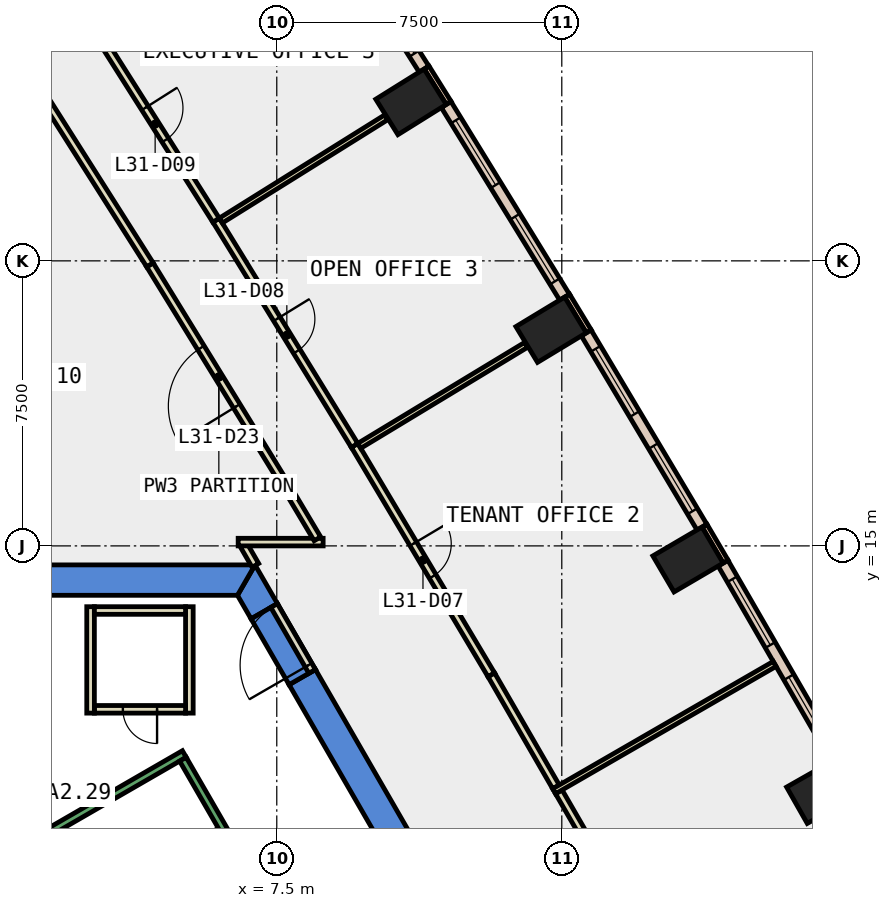
"""IFC4 building model, lengths in metres.
Left out: names, types, materials, properties, quantities, classifications, styles, units other than length and angle.
Written with IfcOpenShell. Run it as: python <this file> out.ifc"""

import sys

from ifc_helpers import new_model, si_unit, direction, frame, frame_2d, origin, origin_2d, place, context, subcontext, project, spatial, polyline, rectangle, outline, extrude, element, fill, save


model = new_model("IFC4")
c1 = context("Model", 3, precision=1e-05, world=origin(), true_north=direction((0.0, 1.0)))
c2 = subcontext(c1, "Body", "Model", "MODEL_VIEW")
j1 = project(units=[si_unit("LENGTHUNIT", "METRE"), si_unit("PLANEANGLEUNIT", "RADIAN")], contexts=[c1])
p1 = place(None, origin())
s1 = spatial("IfcSite", under=j1, at=p1, CompositionType="ELEMENT")
p2 = place(p1, origin())
s2 = spatial("IfcBuilding", under=s1, at=p2, CompositionType="ELEMENT")
p3 = place(p2, frame((0.0, 0.0, 142.4)))
s3 = spatial("IfcBuildingStorey", under=s2, at=p3, CompositionType="ELEMENT", Elevation=142.4)
for number, where, z_axis, x_axis in (
    (1, (21.84, 8.546, -0.4), (0.0, 0.0, 1.0), (-0.494, 0.869, 0.0)),
    (2, (18.322, 14.642, -0.4), (0.0, 0.0, 1.0), (-0.506, 0.863, 0.0)),
    (3, (14.719, 20.688, -0.4), (0.0, 0.0, 1.0), (-0.518, 0.855, 0.0)),
    (4, (11.033, 26.684, -0.4), (0.0, 0.0, 1.0), (-0.53, 0.848, 0.0)),
):
    element("IfcColumn", number, at=place(p3, frame(where, z_axis=z_axis, x_axis=x_axis)), inside=s3, PredefinedType="COLUMN", context=c2, shape_type="SweptSolid", body=[
        extrude(rectangle(XDim=1.1, YDim=1.5, at=origin_2d()), origin(), (0.0, 0.0, 1.0), 4.2),
    ])
p4 = place(p3, frame((0.0, 0.0, -0.4)))
e5 = element("IfcWall", 5, at=p4, inside=s3, PredefinedType="SHEAR", context=c2, shape_type="SweptSolid", body=[
    extrude(outline(polyline([(8.517, 11.748), (7.824, 11.348), (12.933, 2.5), (13.856, 2.5), (8.517, 11.748)])), origin(), (0.0, 0.0, 1.0), 4.2),
])
p5 = place(p3, frame((0.0, 0.0, -0.4)))
e6 = element("IfcWall", 6, at=p5, inside=s3, PredefinedType="SHEAR", context=c2, shape_type="SweptSolid", body=[
    extrude(outline(polyline([(6.824, 13.08), (7.517, 13.48), (6.928, 14.5), (6.466, 13.7), (6.824, 13.08)])), origin(), (0.0, 0.0, 1.0), 4.2),
])
p6 = place(p3, frame((0.0, 0.0, 3.6)))
e7 = element("IfcWall", 7, at=p6, inside=s3, PredefinedType="SHEAR", context=c2, shape_type="SweptSolid", body=[
    extrude(outline(polyline([(7.517, 13.48), (6.824, 13.08), (7.824, 11.348), (8.517, 11.748), (7.517, 13.48)])), origin(), (0.0, 0.0, 1.0), 0.2),
])
p7 = place(p3, frame((0.0, 0.0, -0.4)))
e8 = element("IfcWall", 8, at=p7, inside=s3, PredefinedType="SHEAR", context=c2, shape_type="SweptSolid", body=[
    extrude(outline(polyline([(6.928, 14.5), (-6.928, 14.5), (-6.466, 13.7), (6.466, 13.7), (6.928, 14.5)])), origin(), (0.0, 0.0, 1.0), 4.2),
])
p8 = place(p3, frame((19.312, 14.585, 0.0), z_axis=(0.0, 0.0, 1.0), x_axis=(-0.50667077411, 0.862139621327, 0.0)))
e9 = element("IfcWall", 9, at=p8, inside=s3, PredefinedType="STANDARD", context=c2, shape_type="SweptSolid", body=[
    extrude(rectangle(XDim=1.1, YDim=0.15, at=frame_2d((0.55, 0.0))), origin(), (0.0, 0.0, 1.0), 3.8),
])
for number, where, z_axis, x_axis in (
    (10, (15.71, 20.645, 0.0), (0.0, 0.0, 1.0), (-0.518, 0.855, 0.0)),
    (11, (12.024, 26.655, 0.0), (0.0, 0.0, 1.0), (-0.53, 0.848, 0.0)),
):
    element("IfcWall", number, at=place(p3, frame(where, z_axis=z_axis, x_axis=x_axis)), inside=s3, PredefinedType="STANDARD", context=c2, shape_type="SweptSolid", body=[
        extrude(rectangle(XDim=1.1, YDim=0.15, at=frame_2d((0.55, 0.0))), origin(), (0.0, 0.0, 1.0), 3.8),
    ])
p9 = place(p3, frame((22.218, 9.392, 0.0), z_axis=(0.0, 0.0, 1.0), x_axis=(-0.49994263896, 0.866058518664, 0.0)))
e12 = element("IfcWall", 12, at=p9, inside=s3, PredefinedType="STANDARD", context=c2, shape_type="SweptSolid", body=[
    extrude(rectangle(XDim=5.951, YDim=0.3, at=frame_2d((2.976, 0.0))), origin(), (0.0, 0.0, 1.0), 3.8),
])
p10 = place(p9, frame((0.488, 0.0, 0.9)))
e13 = element("IfcOpeningElement", 13, at=p10, cuts=e12, PredefinedType="OPENING", context=c2, shape_type="SweptSolid", body=[
    extrude(rectangle(XDim=2.0, YDim=2.6, at=frame_2d((1.0, 1.3))), frame((0.0, 0.16, 0.0), z_axis=(0.0, -1.0, 0.0), x_axis=(1.0, 0.0, 0.0)), (0.0, 0.0, 1.0), 0.32),
])
p11 = place(p9, frame((3.463, 0.0, 0.9)))
e14 = element("IfcOpeningElement", 14, at=p11, cuts=e12, PredefinedType="OPENING", context=c2, shape_type="SweptSolid", body=[
    extrude(rectangle(XDim=2.0, YDim=2.6, at=frame_2d((1.0, 1.3))), frame((0.0, 0.16, 0.0), z_axis=(0.0, -1.0, 0.0), x_axis=(1.0, 0.0, 0.0)), (0.0, 0.0, 1.0), 0.32),
])
p12 = place(p3, frame((18.688, 15.493, 0.0), z_axis=(0.0, 0.0, 1.0), x_axis=(-0.511856715331, 0.859070836992, 0.0)))
e15 = element("IfcWall", 15, at=p12, inside=s3, PredefinedType="STANDARD", context=c2, shape_type="SweptSolid", body=[
    extrude(rectangle(XDim=5.951, YDim=0.3, at=frame_2d((2.975, 0.0))), origin(), (0.0, 0.0, 1.0), 3.8),
])
p13 = place(p12, frame((0.488, 0.0, 0.9)))
e16 = element("IfcOpeningElement", 16, at=p13, cuts=e15, PredefinedType="OPENING", context=c2, shape_type="SweptSolid", body=[
    extrude(rectangle(XDim=2.0, YDim=2.6, at=frame_2d((1.0, 1.3))), frame((0.0, 0.16, 0.0), z_axis=(0.0, -1.0, 0.0), x_axis=(1.0, 0.0, 0.0)), (0.0, 0.0, 1.0), 0.32),
])
p14 = place(p12, frame((3.463, 0.0, 0.9)))
e17 = element("IfcOpeningElement", 17, at=p14, cuts=e15, PredefinedType="OPENING", context=c2, shape_type="SweptSolid", body=[
    extrude(rectangle(XDim=2.0, YDim=2.6, at=frame_2d((1.0, 1.3))), frame((0.0, 0.16, 0.0), z_axis=(0.0, -1.0, 0.0), x_axis=(1.0, 0.0, 0.0)), (0.0, 0.0, 1.0), 0.32),
])
p15 = place(p3, frame((15.073, 21.544, 0.0), z_axis=(0.0, 0.0, 1.0), x_axis=(-0.523719731127, 0.851890628677, 0.0)))
e18 = element("IfcWall", 18, at=p15, inside=s3, PredefinedType="STANDARD", context=c2, shape_type="SweptSolid", body=[
    extrude(rectangle(XDim=5.952, YDim=0.3, at=frame_2d((2.976, 0.0))), origin(), (0.0, 0.0, 1.0), 3.8),
])
p16 = place(p15, frame((0.488, 0.0, 0.9)))
e19 = element("IfcOpeningElement", 19, at=p16, cuts=e18, PredefinedType="OPENING", context=c2, shape_type="SweptSolid", body=[
    extrude(rectangle(XDim=2.0, YDim=2.6, at=frame_2d((1.0, 1.3))), frame((0.0, 0.16, 0.0), z_axis=(0.0, -1.0, 0.0), x_axis=(1.0, 0.0, 0.0)), (0.0, 0.0, 1.0), 0.32),
])
p17 = place(p15, frame((3.464, 0.0, 0.9)))
e20 = element("IfcOpeningElement", 20, at=p17, cuts=e18, PredefinedType="OPENING", context=c2, shape_type="SweptSolid", body=[
    extrude(rectangle(XDim=2.0, YDim=2.6, at=frame_2d((1.0, 1.3))), frame((0.0, 0.16, 0.0), z_axis=(0.0, -1.0, 0.0), x_axis=(1.0, 0.0, 0.0)), (0.0, 0.0, 1.0), 0.32),
])
p18 = place(p3, frame((11.375, 27.545, 0.0), z_axis=(0.0, 0.0, 1.0), x_axis=(-0.535403761464, 0.844596242124, 0.0)))
e21 = element("IfcWall", 21, at=p18, inside=s3, PredefinedType="STANDARD", context=c2, shape_type="SweptSolid", body=[
    extrude(rectangle(XDim=5.928, YDim=0.3, at=frame_2d((2.964, 0.0))), origin(), (0.0, 0.0, 1.0), 3.8),
])
p19 = place(p18, frame((0.482, 0.0, 0.9)))
e22 = element("IfcOpeningElement", 22, at=p19, cuts=e21, PredefinedType="OPENING", context=c2, shape_type="SweptSolid", body=[
    extrude(rectangle(XDim=2.0, YDim=2.6, at=frame_2d((1.0, 1.3))), frame((0.0, 0.16, 0.0), z_axis=(0.0, -1.0, 0.0), x_axis=(1.0, 0.0, 0.0)), (0.0, 0.0, 1.0), 0.32),
])
p20 = place(p18, frame((3.446, 0.0, 0.9)))
e23 = element("IfcOpeningElement", 23, at=p20, cuts=e21, PredefinedType="OPENING", context=c2, shape_type="SweptSolid", body=[
    extrude(rectangle(XDim=2.0, YDim=2.6, at=frame_2d((1.0, 1.3))), frame((0.0, 0.16, 0.0), z_axis=(0.0, -1.0, 0.0), x_axis=(1.0, 0.0, 0.0)), (0.0, 0.0, 1.0), 0.32),
])
p21 = place(p3, frame((6.937, 14.488, 0.0), z_axis=(0.0, 0.0, 1.0), x_axis=(-0.499908430952, 0.866078264744, 0.0)))
e24 = element("IfcWall", 24, at=p21, inside=s3, PredefinedType="PARTITIONING", context=c2, shape_type="SweptSolid", body=[
    extrude(rectangle(XDim=0.606, YDim=0.2, at=frame_2d((0.303, 0.0))), origin(), (0.0, 0.0, 1.0), 3.8),
])
p22 = place(p3, frame((6.484, 15.1, 0.0), z_axis=(0.0, 0.0, 1.0), x_axis=(1.0, 0.0, 0.0)))
e25 = element("IfcWall", 25, at=p22, inside=s3, PredefinedType="PARTITIONING", context=c2, shape_type="SweptSolid", body=[
    extrude(rectangle(XDim=2.236, YDim=0.2, at=frame_2d((1.118, 0.0))), origin(), (0.0, 0.0, 1.0), 3.8),
])
p23 = place(p3, frame((8.569, 15.186, 0.0), z_axis=(0.0, 0.0, 1.0), x_axis=(-0.512230585803, 0.85884796499, 0.0)))
e26 = element("IfcWall", 26, at=p23, inside=s3, PredefinedType="PARTITIONING", context=c2, shape_type="SweptSolid", body=[
    extrude(rectangle(XDim=1.523, YDim=0.2, at=frame_2d((0.761, 0.0))), origin(), (0.0, 0.0, 1.0), 3.8),
])
p24 = place(p3, frame((7.789, 16.494, 0.0), z_axis=(0.0, 0.0, 1.0), x_axis=(-0.523625371849, 0.851948631055, 0.0)))
e27 = element("IfcWall", 27, at=p24, inside=s3, PredefinedType="PARTITIONING", context=c2, shape_type="SweptSolid", body=[
    extrude(rectangle(XDim=6.927, YDim=0.2, at=frame_2d((3.463, 0.0))), origin(), (0.0, 0.0, 1.0), 3.8),
])
p25 = place(p24, frame((2.564, 0.0, 0.0)))
e28 = element("IfcOpeningElement", 28, at=p25, cuts=e27, PredefinedType="OPENING", context=c2, shape_type="SweptSolid", body=[
    extrude(rectangle(XDim=1.8, YDim=2.1, at=frame_2d((0.9, 1.05))), frame((0.0, 0.11, 0.0), z_axis=(0.0, -1.0, 0.0), x_axis=(1.0, 0.0, 0.0)), (0.0, 0.0, 1.0), 0.22),
])
p26 = place(p3, frame((4.162, 22.395, 0.0), z_axis=(0.0, 0.0, 1.0), x_axis=(-0.535496886312, 0.844537201519, 0.0)))
e29 = element("IfcWall", 29, at=p26, inside=s3, PredefinedType="PARTITIONING", context=c2, shape_type="SweptSolid", body=[
    extrude(rectangle(XDim=5.927, YDim=0.2, at=frame_2d((2.964, 0.0))), origin(), (0.0, 0.0, 1.0), 3.8),
])
p27 = place(p3, frame((14.922, 8.529, 0.0), z_axis=(0.0, 0.0, 1.0), x_axis=(0.500097109062, -0.865969330582, 0.0)))
e30 = element("IfcWall", 30, at=p27, inside=s3, PredefinedType="PARTITIONING", context=c2, shape_type="SweptSolid", body=[
    extrude(rectangle(XDim=3.403, YDim=0.2, at=frame_2d((1.702, 0.0))), origin(), (0.0, 0.0, 1.0), 3.8),
])
p28 = place(p3, frame((9.548, 17.645, 0.0), z_axis=(0.0, 0.0, 1.0), x_axis=(0.511822081848, -0.859091471575, 0.0)))
e31 = element("IfcWall", 31, at=p28, inside=s3, PredefinedType="PARTITIONING", context=c2, shape_type="SweptSolid", body=[
    extrude(rectangle(XDim=7.03, YDim=0.2, at=frame_2d((3.515, 0.0))), origin(), (0.0, 0.0, 1.0), 3.8),
])
p29 = place(p28, frame((3.015, 0.0, 0.0)))
e32 = element("IfcOpeningElement", 32, at=p29, cuts=e31, PredefinedType="OPENING", context=c2, shape_type="SweptSolid", body=[
    extrude(rectangle(XDim=1.0, YDim=2.1, at=frame_2d((0.5, 1.05))), frame((0.0, 0.11, 0.0), z_axis=(0.0, -1.0, 0.0), x_axis=(1.0, 0.0, 0.0)), (0.0, 0.0, 1.0), 0.22),
])
p30 = place(p3, frame((13.146, 11.606, 0.0), z_axis=(0.0, 0.0, 1.0), x_axis=(0.499881871653, -0.866093594476, 0.0)))
e33 = element("IfcWall", 33, at=p30, inside=s3, PredefinedType="PARTITIONING", context=c2, shape_type="SweptSolid", body=[
    extrude(rectangle(XDim=3.403, YDim=0.2, at=frame_2d((1.701, 0.0))), origin(), (0.0, 0.0, 1.0), 3.8),
])
p31 = place(p3, frame((5.904, 23.571, 0.0), z_axis=(0.0, 0.0, 1.0), x_axis=(0.523647026552, -0.851935321244, 0.0)))
e34 = element("IfcWall", 34, at=p31, inside=s3, PredefinedType="PARTITIONING", context=c2, shape_type="SweptSolid", body=[
    extrude(rectangle(XDim=6.957, YDim=0.2, at=frame_2d((3.479, 0.0))), origin(), (0.0, 0.0, 1.0), 3.8),
])
p32 = place(p31, frame((3.053, 0.0, 0.0)))
e35 = element("IfcOpeningElement", 35, at=p32, cuts=e34, PredefinedType="OPENING", context=c2, shape_type="SweptSolid", body=[
    extrude(rectangle(XDim=1.0, YDim=2.1, at=frame_2d((0.5, 1.05))), frame((0.0, 0.11, 0.0), z_axis=(0.0, -1.0, 0.0), x_axis=(1.0, 0.0, 0.0)), (0.0, 0.0, 1.0), 0.22),
])
p33 = place(p3, frame((2.616, 28.754, 0.0), z_axis=(0.0, 0.0, 1.0), x_axis=(0.535405016332, -0.844595446641, 0.0)))
e36 = element("IfcWall", 36, at=p33, inside=s3, PredefinedType="PARTITIONING", context=c2, shape_type="SweptSolid", body=[
    extrude(rectangle(XDim=6.138, YDim=0.2, at=frame_2d((3.069, 0.0))), origin(), (0.0, 0.0, 1.0), 3.8),
])
p34 = place(p33, frame((2.644, 0.0, 0.0)))
e37 = element("IfcOpeningElement", 37, at=p34, cuts=e36, PredefinedType="OPENING", context=c2, shape_type="SweptSolid", body=[
    extrude(rectangle(XDim=1.0, YDim=2.1, at=frame_2d((0.5, 1.05))), frame((0.0, 0.11, 0.0), z_axis=(0.0, -1.0, 0.0), x_axis=(1.0, 0.0, 0.0)), (0.0, 0.0, 1.0), 0.22),
])
p35 = place(p3, frame((5.2, 13.4, 0.0), z_axis=(0.0, 0.0, 1.0), x_axis=(0.0, -1.0, 0.0)))
e38 = element("IfcWall", 38, at=p35, inside=s3, PredefinedType="PARTITIONING", context=c2, shape_type="SweptSolid", body=[
    extrude(rectangle(XDim=2.8, YDim=0.2, at=frame_2d((1.4, 0.0))), origin(), (0.0, 0.0, 1.0), 3.8),
])
p36 = place(p3, frame((5.1, 10.7, 0.0), z_axis=(0.0, 0.0, 1.0), x_axis=(-1.0, 0.0, 0.0)))
e39 = element("IfcWall", 39, at=p36, inside=s3, PredefinedType="PARTITIONING", context=c2, shape_type="SweptSolid", body=[
    extrude(rectangle(XDim=2.4, YDim=0.2, at=frame_2d((1.2, 0.0))), origin(), (0.0, 0.0, 1.0), 3.8),
])
p37 = place(p36, frame((0.75, 0.0, 0.0)))
e40 = element("IfcOpeningElement", 40, at=p37, cuts=e39, PredefinedType="OPENING", context=c2, shape_type="SweptSolid", body=[
    extrude(rectangle(XDim=0.9, YDim=2.1, at=frame_2d((0.45, 1.05))), frame((0.0, 0.11, 0.0), z_axis=(0.0, -1.0, 0.0), x_axis=(1.0, 0.0, 0.0)), (0.0, 0.0, 1.0), 0.22),
])
p38 = place(p3, frame((2.6, 10.6, 0.0), z_axis=(0.0, 0.0, 1.0), x_axis=(0.0, 1.0, 0.0)))
e41 = element("IfcWall", 41, at=p38, inside=s3, PredefinedType="PARTITIONING", context=c2, shape_type="SweptSolid", body=[
    extrude(rectangle(XDim=2.8, YDim=0.2, at=frame_2d((1.4, 0.0))), origin(), (0.0, 0.0, 1.0), 3.8),
])
p39 = place(p3, frame((2.7, 13.3, 0.0), z_axis=(0.0, 0.0, 1.0), x_axis=(1.0, 0.0, 0.0)))
e42 = element("IfcWall", 42, at=p39, inside=s3, PredefinedType="PARTITIONING", context=c2, shape_type="SweptSolid", body=[
    extrude(rectangle(XDim=2.4, YDim=0.2, at=frame_2d((1.2, 0.0))), origin(), (0.0, 0.0, 1.0), 3.8),
])
p40 = place(p3, frame((14.798, 8.544, 0.0), z_axis=(0.0, 0.0, 1.0), x_axis=(0.866041788654, 0.4999716195, 0.0)))
e43 = element("IfcWall", 43, at=p40, inside=s3, PredefinedType="PARTITIONING", context=c2, shape_type="SweptSolid", body=[
    extrude(rectangle(XDim=6.701, YDim=0.15, at=frame_2d((3.35, 0.0))), origin(), (0.0, 0.0, 1.0), 3.8),
])
p41 = place(p3, frame((9.671, 17.633, 0.0), z_axis=(0.0, 0.0, 1.0), x_axis=(0.855551112805, 0.517718353332, 0.0)))
e44 = element("IfcWall", 44, at=p41, inside=s3, PredefinedType="PARTITIONING", context=c2, shape_type="SweptSolid", body=[
    extrude(rectangle(XDim=5.13, YDim=0.15, at=frame_2d((2.565, 0.0))), origin(), (0.0, 0.0, 1.0), 3.8),
])
p42 = place(p3, frame((6.028, 23.56, 0.0), z_axis=(0.0, 0.0, 1.0), x_axis=(0.848246841914, 0.529601071734, 0.0)))
e45 = element("IfcWall", 45, at=p42, inside=s3, PredefinedType="PARTITIONING", context=c2, shape_type="SweptSolid", body=[
    extrude(rectangle(XDim=5.13, YDim=0.15, at=frame_2d((2.565, 0.0))), origin(), (0.0, 0.0, 1.0), 3.8),
])
p43 = place(p3, frame((8.43, 11.698, 0.0), z_axis=(0.0, 0.0, 1.0), x_axis=(-0.50002537861, 0.866010750942, 0.0)))
e46 = element("IfcWall", 46, at=p43, inside=s3, PredefinedType="PARTITIONING", context=c2, shape_type="SweptSolid", body=[
    extrude(rectangle(XDim=2.0, YDim=0.2, at=frame_2d((1.0, 0.0))), origin(), (0.0, 0.0, 1.0), 2.4),
])
p44 = place(p43, frame((0.19, 0.0, 0.0)))
e47 = element("IfcOpeningElement", 47, at=p44, cuts=e46, PredefinedType="OPENING", context=c2, shape_type="SweptSolid", body=[
    extrude(rectangle(XDim=1.8, YDim=2.1, at=frame_2d((0.9, 1.05))), frame((0.0, 0.11, 0.0), z_axis=(0.0, -1.0, 0.0), x_axis=(1.0, 0.0, 0.0)), (0.0, 0.0, 1.0), 0.22),
])
p45 = place(p3, frame((1.256, 7.324, 0.0), z_axis=(0.0, 0.0, 1.0), x_axis=(0.866046073146, 0.499964197906, 0.0)))
e48 = element("IfcWall", 48, at=p45, inside=s3, PredefinedType="STANDARD", context=c2, shape_type="SweptSolid", body=[
    extrude(rectangle(XDim=4.4, YDim=0.2, at=frame_2d((2.2, 0.0))), origin(), (0.0, 0.0, 1.0), 3.8),
])
p46 = place(p3, frame((8.48, 3.412, 0.0), z_axis=(0.0, 0.0, 1.0), x_axis=(-0.499978703459, 0.866037698999, 0.0)))
e49 = element("IfcWall", 49, at=p46, inside=s3, PredefinedType="STANDARD", context=c2, shape_type="SweptSolid", body=[
    extrude(rectangle(XDim=6.9, YDim=0.2, at=frame_2d((3.45, 0.0))), origin(), (0.0, 0.0, 1.0), 3.8),
])
p47 = place(p10, origin())
e50 = element("IfcWindow", 50, at=p47, inside=s3, PartitioningType="SINGLE_PANEL", PredefinedType="WINDOW", context=c2, shape_type="SweptSolid", body=[
    extrude(rectangle(XDim=2.0, YDim=2.6, at=frame_2d((1.0, 1.3))), frame((0.0, 0.03, 0.0), z_axis=(0.0, -1.0, 0.0), x_axis=(1.0, 0.0, 0.0)), (0.0, 0.0, 1.0), 0.06),
])
fill(e13, e50)
p48 = place(p11, origin())
e51 = element("IfcWindow", 51, at=p48, inside=s3, PartitioningType="SINGLE_PANEL", PredefinedType="WINDOW", context=c2, shape_type="SweptSolid", body=[
    extrude(rectangle(XDim=2.0, YDim=2.6, at=frame_2d((1.0, 1.3))), frame((0.0, 0.03, 0.0), z_axis=(0.0, -1.0, 0.0), x_axis=(1.0, 0.0, 0.0)), (0.0, 0.0, 1.0), 0.06),
])
fill(e14, e51)
p49 = place(p13, origin())
e52 = element("IfcWindow", 52, at=p49, inside=s3, PartitioningType="SINGLE_PANEL", PredefinedType="WINDOW", context=c2, shape_type="SweptSolid", body=[
    extrude(rectangle(XDim=2.0, YDim=2.6, at=frame_2d((1.0, 1.3))), frame((0.0, 0.03, 0.0), z_axis=(0.0, -1.0, 0.0), x_axis=(1.0, 0.0, 0.0)), (0.0, 0.0, 1.0), 0.06),
])
fill(e16, e52)
p50 = place(p14, origin())
e53 = element("IfcWindow", 53, at=p50, inside=s3, PartitioningType="SINGLE_PANEL", PredefinedType="WINDOW", context=c2, shape_type="SweptSolid", body=[
    extrude(rectangle(XDim=2.0, YDim=2.6, at=frame_2d((1.0, 1.3))), frame((0.0, 0.03, 0.0), z_axis=(0.0, -1.0, 0.0), x_axis=(1.0, 0.0, 0.0)), (0.0, 0.0, 1.0), 0.06),
])
fill(e17, e53)
p51 = place(p16, origin())
e54 = element("IfcWindow", 54, at=p51, inside=s3, PartitioningType="SINGLE_PANEL", PredefinedType="WINDOW", context=c2, shape_type="SweptSolid", body=[
    extrude(rectangle(XDim=2.0, YDim=2.6, at=frame_2d((1.0, 1.3))), frame((0.0, 0.03, 0.0), z_axis=(0.0, -1.0, 0.0), x_axis=(1.0, 0.0, 0.0)), (0.0, 0.0, 1.0), 0.06),
])
fill(e19, e54)
p52 = place(p17, origin())
e55 = element("IfcWindow", 55, at=p52, inside=s3, PartitioningType="SINGLE_PANEL", PredefinedType="WINDOW", context=c2, shape_type="SweptSolid", body=[
    extrude(rectangle(XDim=2.0, YDim=2.6, at=frame_2d((1.0, 1.3))), frame((0.0, 0.03, 0.0), z_axis=(0.0, -1.0, 0.0), x_axis=(1.0, 0.0, 0.0)), (0.0, 0.0, 1.0), 0.06),
])
fill(e20, e55)
p53 = place(p19, origin())
e56 = element("IfcWindow", 56, at=p53, inside=s3, PartitioningType="SINGLE_PANEL", PredefinedType="WINDOW", context=c2, shape_type="SweptSolid", body=[
    extrude(rectangle(XDim=2.0, YDim=2.6, at=frame_2d((1.0, 1.3))), frame((0.0, 0.03, 0.0), z_axis=(0.0, -1.0, 0.0), x_axis=(1.0, 0.0, 0.0)), (0.0, 0.0, 1.0), 0.06),
])
fill(e22, e56)
p54 = place(p29, origin())
e57 = element("IfcDoor", 57, at=p54, inside=s3, OperationType="SINGLE_SWING_RIGHT", PredefinedType="DOOR", context=c2, shape_type="SweptSolid", body=[
    extrude(rectangle(XDim=1.0, YDim=2.1, at=frame_2d((0.5, 1.05))), frame((0.0, 0.025, 0.0), z_axis=(0.0, -1.0, 0.0), x_axis=(1.0, 0.0, 0.0)), (0.0, 0.0, 1.0), 0.05),
])
fill(e32, e57)
p55 = place(p32, origin())
e58 = element("IfcDoor", 58, at=p55, inside=s3, OperationType="SINGLE_SWING_LEFT", PredefinedType="DOOR", context=c2, shape_type="SweptSolid", body=[
    extrude(rectangle(XDim=1.0, YDim=2.1, at=frame_2d((0.5, 1.05))), frame((0.0, 0.025, 0.0), z_axis=(0.0, -1.0, 0.0), x_axis=(1.0, 0.0, 0.0)), (0.0, 0.0, 1.0), 0.05),
])
fill(e35, e58)
p56 = place(p34, origin())
e59 = element("IfcDoor", 59, at=p56, inside=s3, OperationType="SINGLE_SWING_LEFT", PredefinedType="DOOR", context=c2, shape_type="SweptSolid", body=[
    extrude(rectangle(XDim=1.0, YDim=2.1, at=frame_2d((0.5, 1.05))), frame((0.0, 0.025, 0.0), z_axis=(0.0, -1.0, 0.0), x_axis=(1.0, 0.0, 0.0)), (0.0, 0.0, 1.0), 0.05),
])
fill(e37, e59)
p57 = place(p25, origin())
e60 = element("IfcDoor", 60, at=p57, inside=s3, OperationType="DOUBLE_DOOR_SINGLE_SWING", PredefinedType="DOOR", context=c2, shape_type="SweptSolid", body=[
    extrude(rectangle(XDim=1.8, YDim=2.1, at=frame_2d((0.9, 1.05))), frame((0.0, 0.025, 0.0), z_axis=(0.0, -1.0, 0.0), x_axis=(1.0, 0.0, 0.0)), (0.0, 0.0, 1.0), 0.05),
])
fill(e28, e60)
p58 = place(p37, origin())
e61 = element("IfcDoor", 61, at=p58, inside=s3, OperationType="SINGLE_SWING_RIGHT", PredefinedType="DOOR", context=c2, shape_type="SweptSolid", body=[
    extrude(rectangle(XDim=0.9, YDim=2.1, at=frame_2d((0.45, 1.05))), frame((0.0, 0.025, 0.0), z_axis=(0.0, -1.0, 0.0), x_axis=(1.0, 0.0, 0.0)), (0.0, 0.0, 1.0), 0.05),
])
fill(e40, e61)
p59 = place(p44, origin())
e62 = element("IfcDoor", 62, at=p59, inside=s3, OperationType="DOUBLE_DOOR_SINGLE_SWING", PredefinedType="DOOR", context=c2, shape_type="SweptSolid", body=[
    extrude(rectangle(XDim=1.8, YDim=2.1, at=frame_2d((0.9, 1.05))), frame((0.0, 0.025, 0.0), z_axis=(0.0, -1.0, 0.0), x_axis=(1.0, 0.0, 0.0)), (0.0, 0.0, 1.0), 0.05),
])
fill(e47, e62)
save(model, sys.argv[1])
